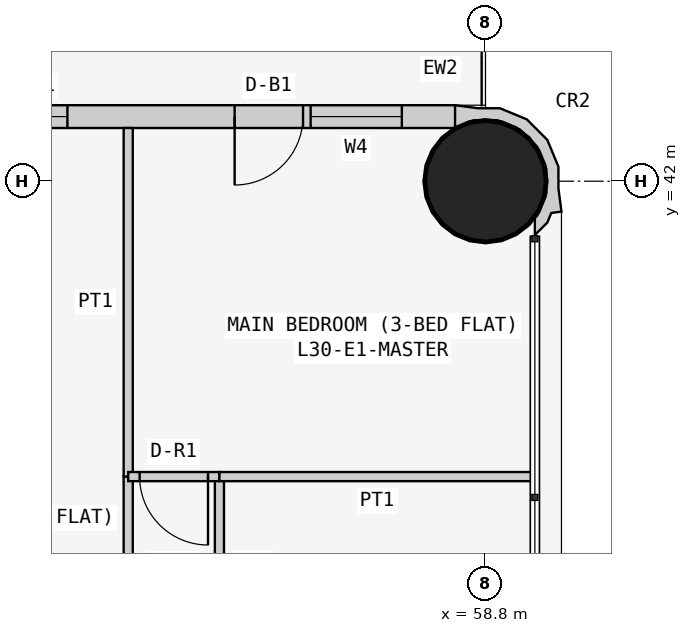
"""IFC4 building model, lengths in metres.
Left out: names, types, materials, properties, quantities, classifications, styles, units other than length and angle.
Written with IfcOpenShell. Run it as: python <this file> out.ifc"""

import sys

from ifc_helpers import new_model, si_unit, direction, frame, frame_2d, origin, origin_2d, place, context, subcontext, project, spatial, polyline, rectangle, circle, outline, extrude, element, fill, save


model = new_model("IFC4")
c1 = context("Model", 3, precision=1e-05, world=origin(), true_north=direction((0.0, 1.0)))
c2 = subcontext(c1, "Body", "Model", "MODEL_VIEW")
j1 = project(units=[si_unit("LENGTHUNIT", "METRE"), si_unit("PLANEANGLEUNIT", "RADIAN")], contexts=[c1])
p1 = place(None, origin())
s1 = spatial("IfcSite", under=j1, at=p1, CompositionType="ELEMENT")
p2 = place(p1, origin())
s2 = spatial("IfcBuilding", under=s1, at=p2, CompositionType="ELEMENT")
p3 = place(p2, frame((0.0, 0.0, 119.7)))
s3 = spatial("IfcBuildingStorey", under=s2, at=p3, CompositionType="ELEMENT", Elevation=119.7)
p4 = place(p3, frame((58.8, 42.0, 0.0), z_axis=(0.0, 0.0, 1.0), x_axis=(1.0, 0.0, 0.0)))
e1 = element("IfcColumn", 1, at=p4, inside=s3, PredefinedType="COLUMN", context=c2, shape_type="SweptSolid", body=[
    extrude(circle(Radius=0.8, at=origin_2d()), origin(), (0.0, 0.0, 1.0), 3.6),
])
p5 = place(p3, frame((58.4, 42.85, 0.0), z_axis=(0.0, 0.0, 1.0), x_axis=(-1.0, 0.0, 0.0)))
e2 = element("IfcWall", 2, at=p5, inside=s3, PredefinedType="SOLIDWALL", context=c2, shape_type="SweptSolid", body=[
    extrude(rectangle(XDim=15.7, YDim=0.3, at=frame_2d((7.85, 0.0))), origin(), (0.0, 0.0, 1.0), 3.45),
])
p6 = place(p5, frame((12.4, 0.0, 0.9)))
e3 = element("IfcOpeningElement", 3, at=p6, cuts=e2, PredefinedType="OPENING", context=c2, shape_type="SweptSolid", body=[
    extrude(rectangle(XDim=1.8, YDim=1.5, at=frame_2d((0.9, 0.75))), frame((0.0, 0.16, 0.0), z_axis=(0.0, -1.0, 0.0), x_axis=(1.0, 0.0, 0.0)), (0.0, 0.0, 1.0), 0.32),
])
p7 = place(p5, frame((9.55, 0.0, 1.5)))
e4 = element("IfcOpeningElement", 4, at=p7, cuts=e2, PredefinedType="OPENING", context=c2, shape_type="SweptSolid", body=[
    extrude(rectangle(XDim=0.9, YDim=0.7, at=frame_2d((0.45, 0.35))), frame((0.0, 0.16, 0.0), z_axis=(0.0, -1.0, 0.0), x_axis=(1.0, 0.0, 0.0)), (0.0, 0.0, 1.0), 0.32),
])
p8 = place(p5, frame((5.1, 0.0, 0.9)))
e5 = element("IfcOpeningElement", 5, at=p8, cuts=e2, PredefinedType="OPENING", context=c2, shape_type="SweptSolid", body=[
    extrude(rectangle(XDim=1.8, YDim=1.5, at=frame_2d((0.9, 0.75))), frame((0.0, 0.16, 0.0), z_axis=(0.0, -1.0, 0.0), x_axis=(1.0, 0.0, 0.0)), (0.0, 0.0, 1.0), 0.32),
])
p9 = place(p5, frame((2.0, 0.0, 0.0)))
e6 = element("IfcOpeningElement", 6, at=p9, cuts=e2, PredefinedType="OPENING", context=c2, shape_type="SweptSolid", body=[
    extrude(rectangle(XDim=0.9, YDim=2.4, at=frame_2d((0.45, 1.2))), frame((0.0, 0.16, 0.0), z_axis=(0.0, -1.0, 0.0), x_axis=(1.0, 0.0, 0.0)), (0.0, 0.0, 1.0), 0.32),
])
p10 = place(p5, frame((0.7, 0.0, 0.9)))
e7 = element("IfcOpeningElement", 7, at=p10, cuts=e2, PredefinedType="OPENING", context=c2, shape_type="SweptSolid", body=[
    extrude(rectangle(XDim=1.2, YDim=1.5, at=frame_2d((0.6, 0.75))), frame((0.0, 0.16, 0.0), z_axis=(0.0, -1.0, 0.0), x_axis=(1.0, 0.0, 0.0)), (0.0, 0.0, 1.0), 0.32),
])
p11 = place(p3, frame((59.395, 41.352, 0.0), z_axis=(0.0, 0.0, 1.0), x_axis=(0.93923434088, 0.343276641956, 0.0)))
e8 = element("IfcWall", 8, at=p11, inside=s3, PredefinedType="SOLIDWALL", context=c2, shape_type="SweptSolid", body=[
    extrude(outline(polyline([(0.532, 0.393), (0.631, 0.663), (0.614, 1.044), (0.453, 1.391), (0.172, 1.649), (-0.097, 1.748), (-0.369, 1.89), (-0.509, 1.621), (-0.491, 1.615), (-0.479, 1.609), (-0.211, 1.62), (0.088, 1.511), (0.323, 1.295), (0.457, 1.006), (0.47, 0.688), (0.361, 0.389), (0.145, 0.154), (0.108, 0.136), (0.031, -0.075), (0.241, 0.023), (0.333, 0.124), (0.465, 0.094), (0.532, 0.393)])), origin(), (0.0, 0.0, 1.0), 3.45),
])
p12 = place(p3, frame((54.1, 35.829, 0.0), z_axis=(0.0, 0.0, 1.0), x_axis=(0.0, 1.0, 0.0)))
e9 = element("IfcWall", 9, at=p12, inside=s3, PredefinedType="PARTITIONING", context=c2, shape_type="SweptSolid", body=[
    extrude(rectangle(XDim=2.285, YDim=0.12, at=frame_2d((1.143, 0.0))), origin(), (0.0, 0.0, 1.0), 3.45),
])
p13 = place(p3, frame((54.1, 38.114, 0.0), z_axis=(0.0, 0.0, 1.0), x_axis=(0.0, 1.0, 0.0)))
e10 = element("IfcWall", 10, at=p13, inside=s3, PredefinedType="PARTITIONING", context=c2, shape_type="SweptSolid", body=[
    extrude(rectangle(XDim=4.586, YDim=0.12, at=frame_2d((2.293, 0.0))), origin(), (0.0, 0.0, 1.0), 3.45),
])
p14 = place(p3, frame((55.3, 35.829, 0.0), z_axis=(0.0, 0.0, 1.0), x_axis=(0.0, 1.0, 0.0)))
e11 = element("IfcWall", 11, at=p14, inside=s3, PredefinedType="PARTITIONING", context=c2, shape_type="SweptSolid", body=[
    extrude(rectangle(XDim=2.285, YDim=0.12, at=frame_2d((1.143, 0.0))), origin(), (0.0, 0.0, 1.0), 3.45),
])
p15 = place(p3, frame((55.3, 38.114, 0.0), z_axis=(0.0, 0.0, 1.0), x_axis=(-1.0, 0.0, 0.0)))
e12 = element("IfcWall", 12, at=p15, inside=s3, PredefinedType="PARTITIONING", context=c2, shape_type="SweptSolid", body=[
    extrude(rectangle(XDim=1.2, YDim=0.12, at=frame_2d((0.6, 0.0))), origin(), (0.0, 0.0, 1.0), 3.45),
])
p16 = place(p15, frame((0.15, 0.0, 0.0)))
e13 = element("IfcOpeningElement", 13, at=p16, cuts=e12, PredefinedType="OPENING", context=c2, shape_type="SweptSolid", body=[
    extrude(rectangle(XDim=0.9, YDim=2.1, at=frame_2d((0.45, 1.05))), frame((0.0, 0.07, 0.0), z_axis=(0.0, -1.0, 0.0), x_axis=(1.0, 0.0, 0.0)), (0.0, 0.0, 1.0), 0.14),
])
p17 = place(p3, frame((59.45, 38.114, 0.0), z_axis=(0.0, 0.0, 1.0), x_axis=(-1.0, 0.0, 0.0)))
e14 = element("IfcWall", 14, at=p17, inside=s3, PredefinedType="PARTITIONING", context=c2, shape_type="SweptSolid", body=[
    extrude(rectangle(XDim=4.15, YDim=0.12, at=frame_2d((2.075, 0.0))), origin(), (0.0, 0.0, 1.0), 3.45),
])
p18 = place(p8, origin())
e15 = element("IfcWindow", 15, at=p18, inside=s3, PartitioningType="SINGLE_PANEL", PredefinedType="WINDOW", context=c2, shape_type="SweptSolid", body=[
    extrude(rectangle(XDim=1.8, YDim=1.5, at=frame_2d((0.9, 0.75))), frame((0.0, 0.03, 0.0), z_axis=(0.0, -1.0, 0.0), x_axis=(1.0, 0.0, 0.0)), (0.0, 0.0, 1.0), 0.06),
])
fill(e5, e15)
p19 = place(p9, origin())
e16 = element("IfcDoor", 16, at=p19, inside=s3, OperationType="SINGLE_SWING_RIGHT", PredefinedType="DOOR", context=c2, shape_type="SweptSolid", body=[
    extrude(rectangle(XDim=0.9, YDim=2.4, at=frame_2d((0.45, 1.2))), frame((0.0, 0.025, 0.0), z_axis=(0.0, -1.0, 0.0), x_axis=(1.0, 0.0, 0.0)), (0.0, 0.0, 1.0), 0.05),
])
fill(e6, e16)
p20 = place(p10, origin())
e17 = element("IfcWindow", 17, at=p20, inside=s3, PartitioningType="SINGLE_PANEL", PredefinedType="WINDOW", context=c2, shape_type="SweptSolid", body=[
    extrude(rectangle(XDim=1.2, YDim=1.5, at=frame_2d((0.6, 0.75))), frame((0.0, 0.03, 0.0), z_axis=(0.0, -1.0, 0.0), x_axis=(1.0, 0.0, 0.0)), (0.0, 0.0, 1.0), 0.06),
])
fill(e7, e17)
p21 = place(p16, origin())
e18 = element("IfcDoor", 18, at=p21, inside=s3, OperationType="SINGLE_SWING_LEFT", PredefinedType="DOOR", context=c2, shape_type="SweptSolid", body=[
    extrude(rectangle(XDim=0.9, YDim=2.1, at=frame_2d((0.45, 1.05))), frame((0.0, 0.025, 0.0), z_axis=(0.0, -1.0, 0.0), x_axis=(1.0, 0.0, 0.0)), (0.0, 0.0, 1.0), 0.05),
])
fill(e13, e18)
save(model, sys.argv[1])
